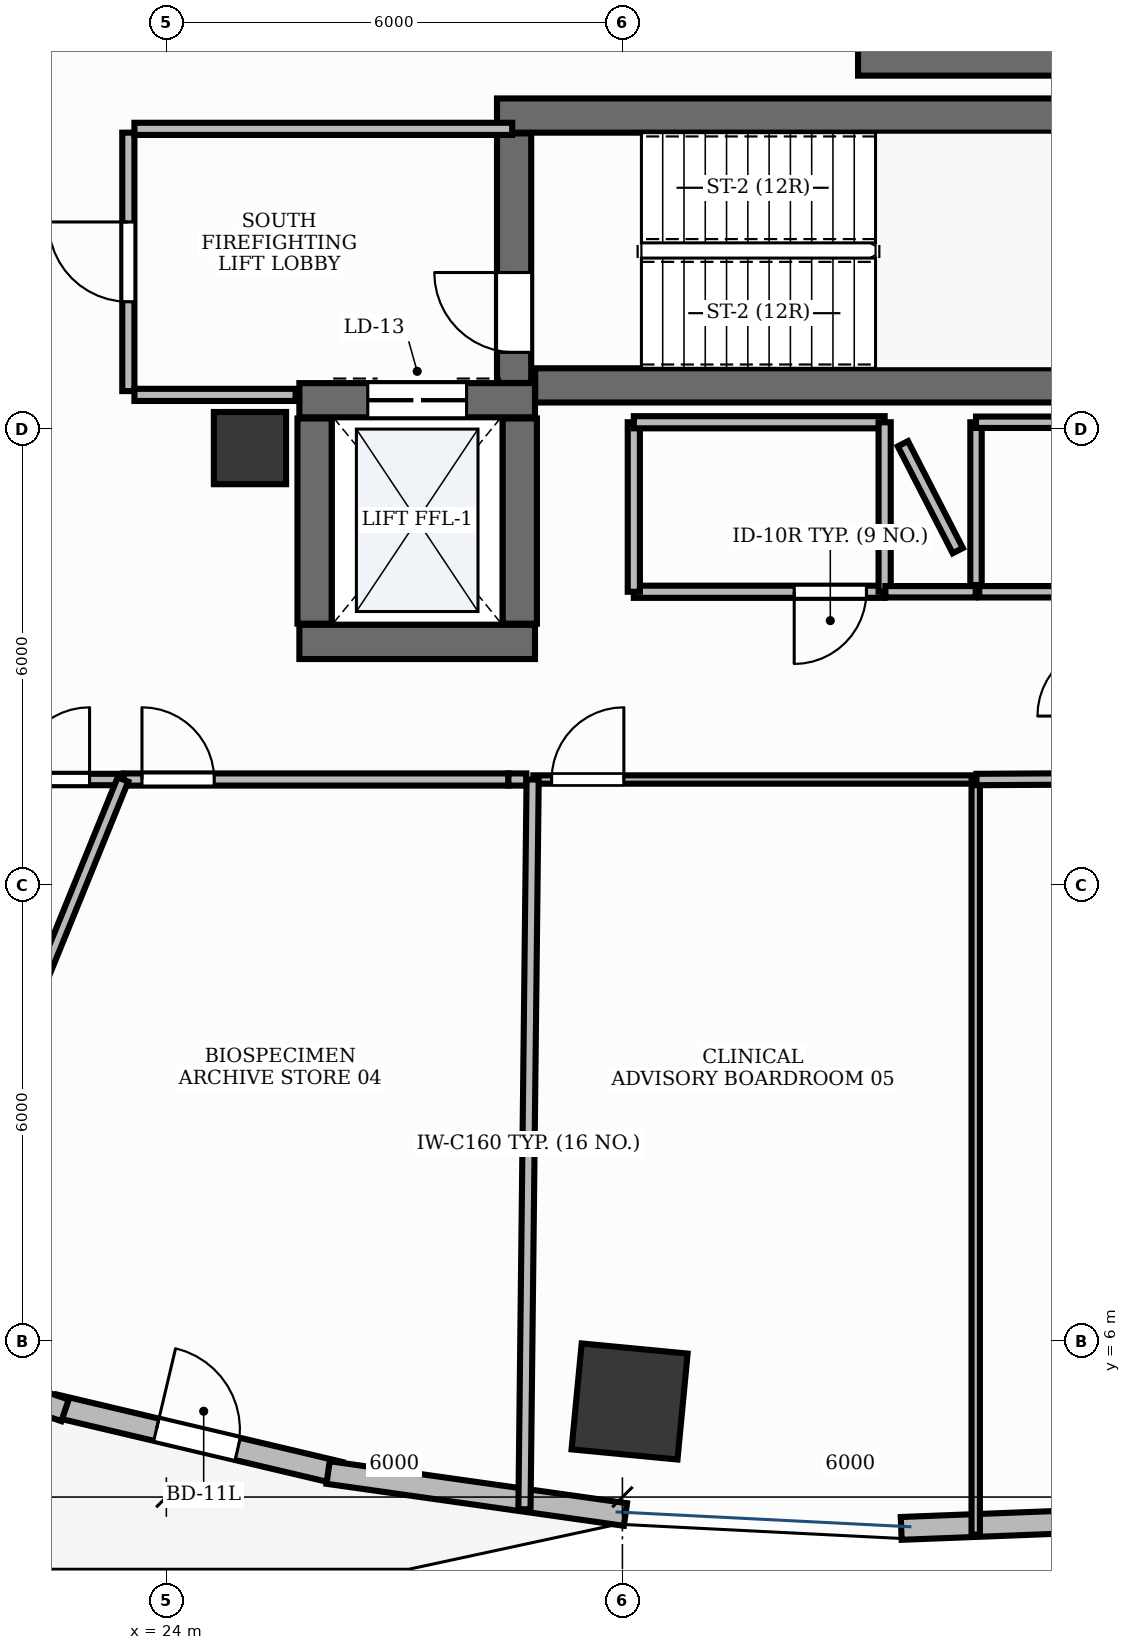
"""IFC4 building model, lengths in metres.
Left out: names, types, materials, properties, quantities, classifications, styles, units other than length and angle.
Written with IfcOpenShell. Run it as: python <this file> out.ifc"""

import sys

from ifc_helpers import new_model, si_unit, direction, frame, frame_2d, origin, origin_2d, place, context, subcontext, project, spatial, rectangle, extrude, element, fill, save


model = new_model("IFC4")
c1 = context("Model", 3, precision=1e-05, world=origin(), true_north=direction((0.0, 1.0)))
c2 = subcontext(c1, "Body", "Model", "MODEL_VIEW")
j1 = project(units=[si_unit("LENGTHUNIT", "METRE"), si_unit("PLANEANGLEUNIT", "RADIAN")], contexts=[c1])
p1 = place(None, origin())
s1 = spatial("IfcSite", under=j1, at=p1, CompositionType="ELEMENT")
p2 = place(p1, origin())
s2 = spatial("IfcBuilding", under=s1, at=p2, CompositionType="ELEMENT")
p3 = place(p2, frame((0.0, 0.0, 42.6)))
s3 = spatial("IfcBuildingStorey", under=s2, at=p3, CompositionType="ELEMENT", Elevation=42.6)
p4 = place(p3, frame((28.852, 18.575, 0.0), z_axis=(0.0, 0.0, 1.0), x_axis=(1.0, 0.0, 0.0)))
e1 = element("IfcWall", 1, at=p4, inside=s3, PredefinedType="SHEAR", context=c2, shape_type="SweptSolid", body=[
    extrude(rectangle(XDim=8.248, YDim=0.45, at=frame_2d((4.124, 0.0))), origin(), (0.0, 0.0, 1.0), 3.9),
])
p5 = place(p3, frame((28.35, 22.125, 0.0), z_axis=(0.0, 0.0, 1.0), x_axis=(1.0, 0.0, 0.0)))
e2 = element("IfcWall", 2, at=p5, inside=s3, PredefinedType="SHEAR", context=c2, shape_type="SweptSolid", body=[
    extrude(rectangle(XDim=8.75, YDim=0.45, at=frame_2d((4.375, 0.0))), origin(), (0.0, 0.0, 1.0), 3.9),
])
p6 = place(p3, frame((28.575, 18.607, 0.0), z_axis=(0.0, 0.0, 1.0), x_axis=(0.0, 1.0, 0.0)))
e3 = element("IfcWall", 3, at=p6, inside=s3, PredefinedType="SHEAR", context=c2, shape_type="SweptSolid", body=[
    extrude(rectangle(XDim=3.283, YDim=0.45, at=frame_2d((1.642, 0.0))), origin(), (0.0, 0.0, 1.0), 3.9),
])
p7 = place(p6, frame((0.403, 0.0, 0.0)))
e4 = element("IfcOpeningElement", 4, at=p7, cuts=e3, PredefinedType="OPENING", context=c2, shape_type="SweptSolid", body=[
    extrude(rectangle(XDim=1.05, YDim=2.15, at=frame_2d((0.525, 1.075))), frame((0.0, 0.24, 0.0), z_axis=(0.0, -1.0, 0.0), x_axis=(1.0, 0.0, 0.0)), (0.0, 0.0, 1.0), 0.48),
])
p8 = place(p3, frame((33.1, 22.875, 0.0), z_axis=(0.0, 0.0, 1.0), x_axis=(1.0, 0.0, 0.0)))
e5 = element("IfcWall", 5, at=p8, inside=s3, PredefinedType="SHEAR", context=c2, shape_type="SweptSolid", body=[
    extrude(rectangle(XDim=4.0, YDim=0.45, at=frame_2d((2.0, 0.0))), origin(), (0.0, 0.0, 1.0), 3.9),
])
p9 = place(p3, frame((25.75, 15.2, 0.0), z_axis=(0.0, 0.0, 1.0), x_axis=(1.0, 0.0, 0.0)))
e6 = element("IfcWall", 6, at=p9, inside=s3, PredefinedType="SHEAR", context=c2, shape_type="SweptSolid", body=[
    extrude(rectangle(XDim=3.1, YDim=0.45, at=frame_2d((1.55, 0.0))), origin(), (0.0, 0.0, 1.0), 3.9),
])
p10 = place(p3, frame((25.75, 18.38, 0.0), z_axis=(0.0, 0.0, 1.0), x_axis=(1.0, 0.0, 0.0)))
e7 = element("IfcWall", 7, at=p10, inside=s3, PredefinedType="SHEAR", context=c2, shape_type="SweptSolid", body=[
    extrude(rectangle(XDim=3.1, YDim=0.45, at=frame_2d((1.55, 0.0))), origin(), (0.0, 0.0, 1.0), 3.9),
])
p11 = place(p10, frame((0.9, 0.0, 0.0)))
e8 = element("IfcOpeningElement", 8, at=p11, cuts=e7, PredefinedType="OPENING", context=c2, shape_type="SweptSolid", body=[
    extrude(rectangle(XDim=1.3, YDim=2.2, at=frame_2d((0.65, 1.1))), frame((0.0, 0.24, 0.0), z_axis=(0.0, -1.0, 0.0), x_axis=(1.0, 0.0, 0.0)), (0.0, 0.0, 1.0), 0.48),
])
for number, where, z_axis, x_axis in (
    (9, (25.95, 15.44, 0.0), (0.0, 0.0, 1.0), (0.0, 1.0, 0.0)),
    (10, (28.65, 15.44, 0.0), (0.0, 0.0, 1.0), (0.0, 1.0, 0.0)),
):
    element("IfcWall", number, at=place(p3, frame(where, z_axis=z_axis, x_axis=x_axis)), inside=s3, PredefinedType="SHEAR", context=c2, shape_type="SweptSolid", body=[
        extrude(rectangle(XDim=2.7, YDim=0.45, at=frame_2d((1.35, 0.0))), origin(), (0.0, 0.0, 1.0), 3.9),
    ])
p12 = place(p3, frame((25.1, 17.75, -0.0), z_axis=(0.0, 0.0, 1.0), x_axis=(1.0, 0.0, 0.0)))
e11 = element("IfcColumn", 11, at=p12, inside=s3, PredefinedType="PILASTER", context=c2, shape_type="SweptSolid", body=[
    extrude(rectangle(XDim=0.95, YDim=0.95, at=origin_2d()), origin(), (0.0, 0.0, 1.0), 3.901),
])
p13 = place(p3, frame((30.094, 5.208, -0.0), z_axis=(0.0, 0.0, 1.0), x_axis=(-0.995462868748, 0.095150811579, 0.0)))
e12 = element("IfcColumn", 12, at=p13, inside=s3, PredefinedType="COLUMN", context=c2, shape_type="SweptSolid", body=[
    extrude(rectangle(XDim=1.4, YDim=1.4, at=origin_2d()), origin(), (0.0, 0.0, 1.0), 3.901),
])
p14 = place(p3, frame((22.525, 5.153, 0.0), z_axis=(0.0, 0.0, 1.0), x_axis=(0.973186156802, -0.230018921417, 0.0)))
e13 = element("IfcWall", 13, at=p14, inside=s3, PredefinedType="STANDARD", context=c2, shape_type="SweptSolid", body=[
    extrude(rectangle(XDim=3.861, YDim=0.3, at=frame_2d((1.931, 0.0))), origin(), (0.0, 0.0, 1.0), 3.9),
])
p15 = place(p14, frame((1.381, 0.0, 0.0)))
e14 = element("IfcOpeningElement", 14, at=p15, cuts=e13, PredefinedType="OPENING", context=c2, shape_type="SweptSolid", body=[
    extrude(rectangle(XDim=1.1, YDim=2.15, at=frame_2d((0.55, 1.075))), frame((0.0, 0.165, 0.0), z_axis=(0.0, -1.0, 0.0), x_axis=(1.0, 0.0, 0.0)), (0.0, 0.0, 1.0), 0.33),
])
p16 = place(p3, frame((19.04, 6.321, 0.0), z_axis=(0.0, 0.0, 1.0), x_axis=(0.94702579403, -0.321157508773, 0.0)))
e15 = element("IfcWall", 15, at=p16, inside=s3, PredefinedType="STANDARD", context=c2, shape_type="SweptSolid", body=[
    extrude(rectangle(XDim=3.83, YDim=0.3, at=frame_2d((1.915, 0.0))), origin(), (0.0, 0.0, 1.0), 3.9),
])
p17 = place(p3, frame((26.128, 4.273, 0.0), z_axis=(0.0, 0.0, 1.0), x_axis=(0.990165832998, -0.139898617443, 0.0)))
e16 = element("IfcWall", 16, at=p17, inside=s3, PredefinedType="STANDARD", context=c2, shape_type="SweptSolid", body=[
    extrude(rectangle(XDim=3.951, YDim=0.3, at=frame_2d((1.976, 0.0))), origin(), (0.0, 0.0, 1.0), 3.9),
])
p18 = place(p3, frame((33.668, 3.538, 0.0), z_axis=(0.0, 0.0, 1.0), x_axis=(0.999245411623, 0.038840794937, 0.0)))
e17 = element("IfcWall", 17, at=p18, inside=s3, PredefinedType="STANDARD", context=c2, shape_type="SweptSolid", body=[
    extrude(rectangle(XDim=3.979, YDim=0.3, at=frame_2d((1.989, 0.0))), origin(), (0.0, 0.0, 1.0), 3.9),
])
p19 = place(p3, frame((23.5, 18.5, 0.0), z_axis=(0.0, 0.0, 1.0), x_axis=(0.0, 1.0, 0.0)))
e18 = element("IfcWall", 18, at=p19, inside=s3, PredefinedType="PARTITIONING", context=c2, shape_type="SweptSolid", body=[
    extrude(rectangle(XDim=3.4, YDim=0.16, at=frame_2d((1.7, 0.0))), origin(), (0.0, 0.0, 1.0), 2.91),
])
p20 = place(p19, frame((1.175, 0.0, 0.0)))
e19 = element("IfcOpeningElement", 19, at=p20, cuts=e18, PredefinedType="OPENING", context=c2, shape_type="SweptSolid", body=[
    extrude(rectangle(XDim=1.05, YDim=2.15, at=frame_2d((0.525, 1.075))), frame((0.0, 0.095, 0.0), z_axis=(0.0, -1.0, 0.0), x_axis=(1.0, 0.0, 0.0)), (0.0, 0.0, 1.0), 0.19),
])
p21 = place(p3, frame((23.58, 21.95, 0.0), z_axis=(0.0, 0.0, 1.0), x_axis=(1.0, 0.0, 0.0)))
e20 = element("IfcWall", 20, at=p21, inside=s3, PredefinedType="PARTITIONING", context=c2, shape_type="SweptSolid", body=[
    extrude(rectangle(XDim=4.97, YDim=0.16, at=frame_2d((2.485, 0.0))), origin(), (0.0, 0.0, 1.0), 2.91),
])
p22 = place(p3, frame((23.58, 18.45, 0.0), z_axis=(0.0, 0.0, 1.0), x_axis=(1.0, 0.0, 0.0)))
e21 = element("IfcWall", 21, at=p22, inside=s3, PredefinedType="PARTITIONING", context=c2, shape_type="SweptSolid", body=[
    extrude(rectangle(XDim=2.12, YDim=0.16, at=frame_2d((1.06, 0.0))), origin(), (0.0, 0.0, 1.0), 2.91),
])
p23 = place(p3, frame((33.45, 15.86, 0.0), z_axis=(0.0, 0.0, 1.0), x_axis=(-1.0, 0.0, 0.0)))
e22 = element("IfcWall", 22, at=p23, inside=s3, PredefinedType="PARTITIONING", context=c2, shape_type="SweptSolid", body=[
    extrude(rectangle(XDim=3.3, YDim=0.16, at=frame_2d((1.65, 0.0))), origin(), (0.0, 0.0, 1.0), 2.91),
])
p24 = place(p23, frame((0.24, 0.0, 0.0)))
e23 = element("IfcOpeningElement", 23, at=p24, cuts=e22, PredefinedType="OPENING", context=c2, shape_type="SweptSolid", body=[
    extrude(rectangle(XDim=0.95, YDim=2.15, at=frame_2d((0.475, 1.075))), frame((0.0, 0.095, 0.0), z_axis=(0.0, -1.0, 0.0), x_axis=(1.0, 0.0, 0.0)), (0.0, 0.0, 1.0), 0.19),
])
p25 = place(p3, frame((21.8, 13.39, 0.0), z_axis=(0.0, 0.0, 1.0), x_axis=(1.0, 0.0, 0.0)))
e24 = element("IfcWall", 24, at=p25, inside=s3, PredefinedType="PARTITIONING", context=c2, shape_type="SweptSolid", body=[
    extrude(rectangle(XDim=1.629, YDim=0.15, at=frame_2d((0.814, 0.0))), origin(), (0.0, 0.0, 1.0), 2.91),
])
p26 = place(p25, frame((0.24, 0.0, 0.0)))
e25 = element("IfcOpeningElement", 25, at=p26, cuts=e24, PredefinedType="OPENING", context=c2, shape_type="SweptSolid", body=[
    extrude(rectangle(XDim=0.95, YDim=2.15, at=frame_2d((0.475, 1.075))), frame((0.0, 0.09, 0.0), z_axis=(0.0, -1.0, 0.0), x_axis=(1.0, 0.0, 0.0)), (0.0, 0.0, 1.0), 0.18),
])
p27 = place(p3, frame((23.439, 13.39, 0.0), z_axis=(0.0, 0.0, 1.0), x_axis=(1.0, 0.0, 0.0)))
e26 = element("IfcWall", 26, at=p27, inside=s3, PredefinedType="PARTITIONING", context=c2, shape_type="SweptSolid", body=[
    extrude(rectangle(XDim=5.061, YDim=0.16, at=frame_2d((2.53, 0.0))), origin(), (0.0, 0.0, 1.0), 2.91),
])
p28 = place(p27, frame((0.24, 0.0, 0.0)))
e27 = element("IfcOpeningElement", 27, at=p28, cuts=e26, PredefinedType="OPENING", context=c2, shape_type="SweptSolid", body=[
    extrude(rectangle(XDim=0.95, YDim=2.15, at=frame_2d((0.475, 1.075))), frame((0.0, 0.095, 0.0), z_axis=(0.0, -1.0, 0.0), x_axis=(1.0, 0.0, 0.0)), (0.0, 0.0, 1.0), 0.19),
])
p29 = place(p3, frame((28.829, 13.39, 0.0), z_axis=(0.0, 0.0, 1.0), x_axis=(1.0, 0.0, 0.0)))
e28 = element("IfcWall", 28, at=p29, inside=s3, PredefinedType="MOVABLE", context=c2, shape_type="SweptSolid", body=[
    extrude(rectangle(XDim=5.819, YDim=0.11, at=frame_2d((2.91, 0.0))), origin(), (0.0, 0.0, 1.0), 2.91),
])
p30 = place(p29, frame((0.24, 0.0, 0.0)))
e29 = element("IfcOpeningElement", 29, at=p30, cuts=e28, PredefinedType="OPENING", context=c2, shape_type="SweptSolid", body=[
    extrude(rectangle(XDim=0.95, YDim=2.15, at=frame_2d((0.475, 1.075))), frame((0.0, 0.07, 0.0), z_axis=(0.0, -1.0, 0.0), x_axis=(1.0, 0.0, 0.0)), (0.0, 0.0, 1.0), 0.14),
])
p31 = place(p3, frame((30.15, 15.86, 0.0), z_axis=(0.0, 0.0, 1.0), x_axis=(0.0, 1.0, 0.0)))
e30 = element("IfcWall", 30, at=p31, inside=s3, PredefinedType="PARTITIONING", context=c2, shape_type="SweptSolid", body=[
    extrude(rectangle(XDim=2.23, YDim=0.16, at=frame_2d((1.115, 0.0))), origin(), (0.0, 0.0, 1.0), 2.91),
])
p32 = place(p3, frame((30.15, 18.09, 0.0), z_axis=(0.0, 0.0, 1.0), x_axis=(1.0, 0.0, 0.0)))
e31 = element("IfcWall", 31, at=p32, inside=s3, PredefinedType="PARTITIONING", context=c2, shape_type="SweptSolid", body=[
    extrude(rectangle(XDim=3.3, YDim=0.16, at=frame_2d((1.65, 0.0))), origin(), (0.0, 0.0, 1.0), 2.91),
])
p33 = place(p3, frame((33.45, 18.09, 0.0), z_axis=(0.0, 0.0, 1.0), x_axis=(0.0, -1.0, 0.0)))
e32 = element("IfcWall", 32, at=p33, inside=s3, PredefinedType="PARTITIONING", context=c2, shape_type="SweptSolid", body=[
    extrude(rectangle(XDim=2.23, YDim=0.16, at=frame_2d((1.115, 0.0))), origin(), (0.0, 0.0, 1.0), 2.91),
])
p34 = place(p3, frame((23.429, 13.39, 0.0), z_axis=(0.0, 0.0, 1.0), x_axis=(-0.377151920135, -0.926151407243, 0.0)))
e33 = element("IfcWall", 33, at=p34, inside=s3, PredefinedType="PARTITIONING", context=c2, shape_type="SweptSolid", body=[
    extrude(rectangle(XDim=8.239, YDim=0.15, at=frame_2d((4.119, 0.0))), origin(), (0.0, 0.0, 1.0), 2.91),
])
p35 = place(p3, frame((28.5, 13.39, 0.0), z_axis=(0.0, 0.0, 1.0), x_axis=(1.0, 0.0, 0.0)))
e34 = element("IfcWall", 34, at=p35, inside=s3, PredefinedType="PARTITIONING", context=c2, shape_type="SweptSolid", body=[
    extrude(rectangle(XDim=0.236, YDim=0.16, at=frame_2d((0.118, 0.0))), origin(), (0.0, 0.0, 1.0), 2.91),
])
p36 = place(p3, frame((28.819, 13.39, 0.0), z_axis=(0.0, 0.0, 1.0), x_axis=(-0.011213820346, -0.99993712314, 0.0)))
e35 = element("IfcWall", 35, at=p36, inside=s3, PredefinedType="PARTITIONING", context=c2, shape_type="SweptSolid", body=[
    extrude(rectangle(XDim=9.601, YDim=0.16, at=frame_2d((4.801, 0.0))), origin(), (0.0, 0.0, 1.0), 2.91),
])
p37 = place(p3, frame((34.648, 13.39, 0.0), z_axis=(0.0, 0.0, 1.0), x_axis=(0.0, -1.0, 0.0)))
e36 = element("IfcWall", 36, at=p37, inside=s3, PredefinedType="MOVABLE", context=c2, shape_type="SweptSolid", body=[
    extrude(rectangle(XDim=9.934, YDim=0.11, at=frame_2d((4.967, 0.0))), origin(), (0.0, 0.0, 1.0), 2.91),
])
p38 = place(p3, frame((34.652, 15.95, 0.0), z_axis=(0.0, 0.0, 1.0), x_axis=(0.0, 1.0, 0.0)))
e37 = element("IfcWall", 37, at=p38, inside=s3, PredefinedType="PARTITIONING", context=c2, shape_type="SweptSolid", body=[
    extrude(rectangle(XDim=2.14, YDim=0.15, at=frame_2d((1.07, 0.0))), origin(), (0.0, 0.0, 1.0), 2.91),
])
p39 = place(p3, frame((34.652, 18.09, 0.0), z_axis=(0.0, 0.0, 1.0), x_axis=(1.0, 0.0, 0.0)))
e38 = element("IfcWall", 38, at=p39, inside=s3, PredefinedType="PARTITIONING", context=c2, shape_type="SweptSolid", body=[
    extrude(rectangle(XDim=2.698, YDim=0.15, at=frame_2d((1.349, 0.0))), origin(), (0.0, 0.0, 1.0), 2.91),
])
p40 = place(p3, frame((34.658, 13.39, 0.0), z_axis=(0.0, 0.0, 1.0), x_axis=(0.999983490307, 0.005746226083, 0.0)))
e39 = element("IfcWall", 39, at=p40, inside=s3, PredefinedType="PARTITIONING", context=c2, shape_type="SweptSolid", body=[
    extrude(rectangle(XDim=1.742, YDim=0.15, at=frame_2d((0.871, 0.0))), origin(), (0.0, 0.0, 1.0), 2.91),
])
p41 = place(p3, frame((36.4, 15.86, 0.0), z_axis=(0.0, 0.0, 1.0), x_axis=(-1.0, 0.0, 0.0)))
e40 = element("IfcWall", 40, at=p41, inside=s3, PredefinedType="PARTITIONING", context=c2, shape_type="SweptSolid", body=[
    extrude(rectangle(XDim=1.706, YDim=0.15, at=frame_2d((0.853, 0.0))), origin(), (0.0, 0.0, 1.0), 2.91),
])
p42 = place(p3, frame((34.648, 15.86, 0.0), z_axis=(0.0, 0.0, 1.0), x_axis=(-1.0, 0.0, 0.0)))
e41 = element("IfcWall", 41, at=p42, inside=s3, PredefinedType="PARTITIONING", context=c2, shape_type="SweptSolid", body=[
    extrude(rectangle(XDim=1.188, YDim=0.15, at=frame_2d((0.594, 0.0))), origin(), (0.0, 0.0, 1.0), 2.91),
])
p43 = place(p3, frame((33.69, 17.807, 0.0), z_axis=(0.0, 0.0, 1.0), x_axis=(0.45676175153, -0.889589063747, 0.0)))
e42 = element("IfcWall", 42, at=p43, inside=s3, PredefinedType="PARTITIONING", context=c2, shape_type="SweptSolid", body=[
    extrude(rectangle(XDim=1.581, YDim=0.15, at=frame_2d((0.791, 0.0))), origin(), (0.0, 0.0, 1.0), 2.91),
])
p44 = place(p15, origin())
e43 = element("IfcDoor", 43, at=p44, inside=s3, OperationType="SINGLE_SWING_LEFT", PredefinedType="DOOR", context=c2, shape_type="SweptSolid", body=[
    extrude(rectangle(XDim=1.1, YDim=2.15, at=frame_2d((0.55, 1.075))), frame((0.0, 0.025, 0.0), z_axis=(0.0, -1.0, 0.0), x_axis=(1.0, 0.0, 0.0)), (0.0, 0.0, 1.0), 0.05),
])
fill(e14, e43)
p45 = place(p7, origin())
e44 = element("IfcDoor", 44, at=p45, inside=s3, OperationType="SINGLE_SWING_RIGHT", PredefinedType="DOOR", context=c2, shape_type="SweptSolid", body=[
    extrude(rectangle(XDim=1.05, YDim=2.15, at=frame_2d((0.525, 1.075))), frame((0.0, 0.025, 0.0), z_axis=(0.0, -1.0, 0.0), x_axis=(1.0, 0.0, 0.0)), (0.0, 0.0, 1.0), 0.05),
])
fill(e4, e44)
p46 = place(p11, origin())
e45 = element("IfcDoor", 45, at=p46, inside=s3, OperationType="DOUBLE_DOOR_SLIDING", PredefinedType="DOOR", context=c2, shape_type="SweptSolid", body=[
    extrude(rectangle(XDim=1.3, YDim=2.2, at=frame_2d((0.65, 1.1))), frame((0.0, 0.025, 0.0), z_axis=(0.0, -1.0, 0.0), x_axis=(1.0, 0.0, 0.0)), (0.0, 0.0, 1.0), 0.05),
])
fill(e8, e45)
p47 = place(p20, origin())
e46 = element("IfcDoor", 46, at=p47, inside=s3, OperationType="SINGLE_SWING_RIGHT", PredefinedType="DOOR", context=c2, shape_type="SweptSolid", body=[
    extrude(rectangle(XDim=1.05, YDim=2.15, at=frame_2d((0.525, 1.075))), frame((0.0, 0.025, 0.0), z_axis=(0.0, -1.0, 0.0), x_axis=(1.0, 0.0, 0.0)), (0.0, 0.0, 1.0), 0.05),
])
fill(e19, e46)
p48 = place(p24, origin())
e47 = element("IfcDoor", 47, at=p48, inside=s3, OperationType="SINGLE_SWING_RIGHT", PredefinedType="DOOR", context=c2, shape_type="SweptSolid", body=[
    extrude(rectangle(XDim=0.95, YDim=2.15, at=frame_2d((0.475, 1.075))), frame((0.0, 0.025, 0.0), z_axis=(0.0, -1.0, 0.0), x_axis=(1.0, 0.0, 0.0)), (0.0, 0.0, 1.0), 0.05),
])
fill(e23, e47)
p49 = place(p26, origin())
e48 = element("IfcDoor", 48, at=p49, inside=s3, OperationType="SINGLE_SWING_RIGHT", PredefinedType="DOOR", context=c2, shape_type="SweptSolid", body=[
    extrude(rectangle(XDim=0.95, YDim=2.15, at=frame_2d((0.475, 1.075))), frame((0.0, 0.025, 0.0), z_axis=(0.0, -1.0, 0.0), x_axis=(1.0, 0.0, 0.0)), (0.0, 0.0, 1.0), 0.05),
])
fill(e25, e48)
p50 = place(p28, origin())
e49 = element("IfcDoor", 49, at=p50, inside=s3, OperationType="SINGLE_SWING_LEFT", PredefinedType="DOOR", context=c2, shape_type="SweptSolid", body=[
    extrude(rectangle(XDim=0.95, YDim=2.15, at=frame_2d((0.475, 1.075))), frame((0.0, 0.025, 0.0), z_axis=(0.0, -1.0, 0.0), x_axis=(1.0, 0.0, 0.0)), (0.0, 0.0, 1.0), 0.05),
])
fill(e27, e49)
p51 = place(p30, origin())
e50 = element("IfcDoor", 50, at=p51, inside=s3, OperationType="SINGLE_SWING_RIGHT", PredefinedType="DOOR", context=c2, shape_type="SweptSolid", body=[
    extrude(rectangle(XDim=0.95, YDim=2.15, at=frame_2d((0.475, 1.075))), frame((0.0, 0.025, 0.0), z_axis=(0.0, -1.0, 0.0), x_axis=(1.0, 0.0, 0.0)), (0.0, 0.0, 1.0), 0.05),
])
fill(e29, e50)
save(model, sys.argv[1])
